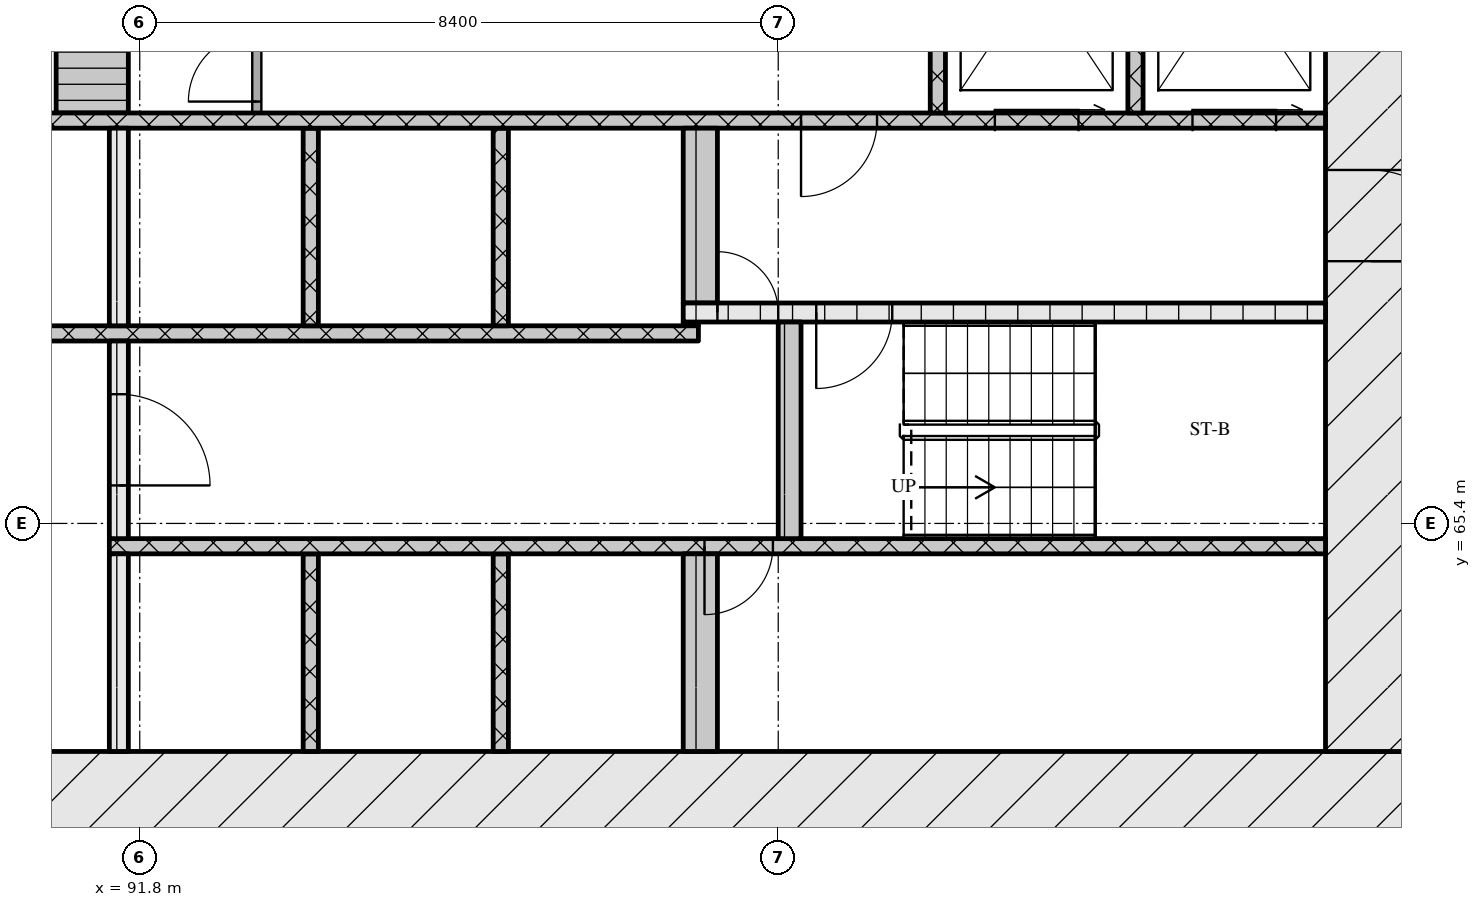
"""IFC4 building model, lengths in metres.
Left out: names, types, materials, properties, quantities, classifications, styles, units other than length and angle.
Written with IfcOpenShell. Run it as: python <this file> out.ifc"""

import sys

from ifc_helpers import new_model, si_unit, direction, frame, frame_2d, origin, place, context, subcontext, project, spatial, rectangle, extrude, element, fill, save


model = new_model("IFC4")
c1 = context("Model", 3, precision=1e-05, world=origin(), true_north=direction((0.0, 1.0)))
c2 = subcontext(c1, "Body", "Model", "MODEL_VIEW")
j1 = project(units=[si_unit("LENGTHUNIT", "METRE"), si_unit("PLANEANGLEUNIT", "RADIAN")], contexts=[c1])
p1 = place(None, origin())
s1 = spatial("IfcSite", under=j1, at=p1, CompositionType="ELEMENT")
p2 = place(p1, origin())
s2 = spatial("IfcBuilding", under=s1, at=p2, CompositionType="ELEMENT")
p3 = place(p2, frame((0.0, 0.0, 44.4)))
s3 = spatial("IfcBuildingStorey", under=s2, at=p3, CompositionType="ELEMENT", Elevation=44.4)
p4 = place(p3, frame((66.6, 61.8, 0.0), z_axis=(0.0, 0.0, 1.0), x_axis=(1.0, 0.0, 0.0)))
e1 = element("IfcWall", 1, at=p4, inside=s3, PredefinedType="SOLIDWALL", context=c2, shape_type="SweptSolid", body=[
    extrude(rectangle(XDim=42.0, YDim=1.2, at=frame_2d((21.0, 0.0))), origin(), (0.0, 0.0, 1.0), 3.32),
])
p5 = place(p4, frame((21.35, 0.0, 0.0)))
e2 = element("IfcOpeningElement", 2, at=p5, cuts=e1, PredefinedType="OPENING", context=c2, shape_type="SweptSolid", body=[
    extrude(rectangle(XDim=1.8, YDim=2.1, at=frame_2d((0.9, 1.05))), frame((0.0, 0.61, 0.0), z_axis=(0.0, -1.0, 0.0), x_axis=(1.0, 0.0, 0.0)), (0.0, 0.0, 1.0), 1.22),
])
p6 = place(p3, frame((108.0, 62.4, 0.0), z_axis=(0.0, 0.0, 1.0), x_axis=(0.0, 1.0, 0.0)))
e3 = element("IfcWall", 3, at=p6, inside=s3, PredefinedType="SOLIDWALL", context=c2, shape_type="SweptSolid", body=[
    extrude(rectangle(XDim=12.0, YDim=1.2, at=frame_2d((6.0, 0.0))), origin(), (0.0, 0.0, 1.0), 3.32),
])
p7 = place(p6, frame((6.45, 0.0, 0.0)))
e4 = element("IfcOpeningElement", 4, at=p7, cuts=e3, PredefinedType="OPENING", context=c2, shape_type="SweptSolid", body=[
    extrude(rectangle(XDim=1.2, YDim=2.1, at=frame_2d((0.6, 1.05))), frame((0.0, 0.61, 0.0), z_axis=(0.0, -1.0, 0.0), x_axis=(1.0, 0.0, 0.0)), (0.0, 0.0, 1.0), 1.22),
])
p8 = place(p3, frame((91.525, 62.4, 0.0), z_axis=(0.0, 0.0, 1.0), x_axis=(0.0, 1.0, 0.0)))
e5 = element("IfcWall", 5, at=p8, inside=s3, PredefinedType="SOLIDWALL", context=c2, shape_type="SweptSolid", body=[
    extrude(rectangle(XDim=2.6, YDim=0.25, at=frame_2d((1.3, 0.0))), origin(), (0.0, 0.0, 1.0), 3.32),
])
for number, where, z_axis, x_axis in (
    (6, (94.05, 62.4, 0.0), (0.0, 0.0, 1.0), (0.0, 1.0, 0.0)),
    (7, (96.55, 62.4, 0.0), (0.0, 0.0, 1.0), (0.0, 1.0, 0.0)),
):
    element("IfcWall", number, at=place(p3, frame(where, z_axis=z_axis, x_axis=x_axis)), inside=s3, PredefinedType="SOLIDWALL", context=c2, shape_type="SweptSolid", body=[
        extrude(rectangle(XDim=2.6, YDim=0.2, at=frame_2d((1.3, 0.0))), origin(), (0.0, 0.0, 1.0), 3.32),
    ])
p9 = place(p3, frame((99.175, 62.4, 0.0), z_axis=(0.0, 0.0, 1.0), x_axis=(0.0, 1.0, 0.0)))
e8 = element("IfcWall", 8, at=p9, inside=s3, PredefinedType="SOLIDWALL", context=c2, shape_type="SweptSolid", body=[
    extrude(rectangle(XDim=2.6, YDim=0.45, at=frame_2d((1.3, 0.0))), origin(), (0.0, 0.0, 1.0), 3.32),
])
p10 = place(p3, frame((91.4, 65.1, 0.0), z_axis=(0.0, 0.0, 1.0), x_axis=(1.0, 0.0, 0.0)))
e9 = element("IfcWall", 9, at=p10, inside=s3, PredefinedType="SOLIDWALL", context=c2, shape_type="SweptSolid", body=[
    extrude(rectangle(XDim=16.0, YDim=0.2, at=frame_2d((8.0, 0.0))), origin(), (0.0, 0.0, 1.0), 3.32),
])
p11 = place(p10, frame((7.83, 0.0, 0.0)))
e10 = element("IfcOpeningElement", 10, at=p11, cuts=e9, PredefinedType="OPENING", context=c2, shape_type="SweptSolid", body=[
    extrude(rectangle(XDim=0.9, YDim=2.1, at=frame_2d((0.45, 1.05))), frame((0.0, 0.11, 0.0), z_axis=(0.0, -1.0, 0.0), x_axis=(1.0, 0.0, 0.0)), (0.0, 0.0, 1.0), 0.22),
])
p12 = place(p3, frame((91.525, 65.2, 0.0), z_axis=(0.0, 0.0, 1.0), x_axis=(0.0, 1.0, 0.0)))
e11 = element("IfcWall", 11, at=p12, inside=s3, PredefinedType="SOLIDWALL", context=c2, shape_type="SweptSolid", body=[
    extrude(rectangle(XDim=2.6, YDim=0.25, at=frame_2d((1.3, 0.0))), origin(), (0.0, 0.0, 1.0), 3.32),
])
p13 = place(p12, frame((0.7, 0.0, 0.0)))
e12 = element("IfcOpeningElement", 12, at=p13, cuts=e11, PredefinedType="OPENING", context=c2, shape_type="SweptSolid", body=[
    extrude(rectangle(XDim=1.2, YDim=2.1, at=frame_2d((0.6, 1.05))), frame((0.0, 0.135, 0.0), z_axis=(0.0, -1.0, 0.0), x_axis=(1.0, 0.0, 0.0)), (0.0, 0.0, 1.0), 0.27),
])
p14 = place(p3, frame((100.35, 65.2, 0.0), z_axis=(0.0, 0.0, 1.0), x_axis=(0.0, 1.0, 0.0)))
e13 = element("IfcWall", 13, at=p14, inside=s3, PredefinedType="SOLIDWALL", context=c2, shape_type="SweptSolid", body=[
    extrude(rectangle(XDim=2.85, YDim=0.3, at=frame_2d((1.425, 0.0))), origin(), (0.0, 0.0, 1.0), 3.32),
])
p15 = place(p3, frame((76.05, 67.9, 0.0), z_axis=(0.0, 0.0, 1.0), x_axis=(1.0, 0.0, 0.0)))
e14 = element("IfcWall", 14, at=p15, inside=s3, PredefinedType="SOLIDWALL", context=c2, shape_type="SweptSolid", body=[
    extrude(rectangle(XDim=23.1, YDim=0.2, at=frame_2d((11.55, 0.0))), origin(), (0.0, 0.0, 1.0), 3.32),
])
p16 = place(p15, frame((0.6, 0.0, 0.0)))
e15 = element("IfcOpeningElement", 15, at=p16, cuts=e14, PredefinedType="OPENING", context=c2, shape_type="SweptSolid", body=[
    extrude(rectangle(XDim=1.1, YDim=2.1, at=frame_2d((0.55, 1.05))), frame((0.0, 0.11, 0.0), z_axis=(0.0, -1.0, 0.0), x_axis=(1.0, 0.0, 0.0)), (0.0, 0.0, 1.0), 0.22),
])
p17 = place(p15, frame((3.1, 0.0, 0.0)))
e16 = element("IfcOpeningElement", 16, at=p17, cuts=e14, PredefinedType="OPENING", context=c2, shape_type="SweptSolid", body=[
    extrude(rectangle(XDim=1.1, YDim=2.1, at=frame_2d((0.55, 1.05))), frame((0.0, 0.11, 0.0), z_axis=(0.0, -1.0, 0.0), x_axis=(1.0, 0.0, 0.0)), (0.0, 0.0, 1.0), 0.22),
])
p18 = place(p15, frame((5.6, 0.0, 0.0)))
e17 = element("IfcOpeningElement", 17, at=p18, cuts=e14, PredefinedType="OPENING", context=c2, shape_type="SweptSolid", body=[
    extrude(rectangle(XDim=1.1, YDim=2.1, at=frame_2d((0.55, 1.05))), frame((0.0, 0.11, 0.0), z_axis=(0.0, -1.0, 0.0), x_axis=(1.0, 0.0, 0.0)), (0.0, 0.0, 1.0), 0.22),
])
p19 = place(p15, frame((8.45, 0.0, 0.0)))
e18 = element("IfcOpeningElement", 18, at=p19, cuts=e14, PredefinedType="OPENING", context=c2, shape_type="SweptSolid", body=[
    extrude(rectangle(XDim=0.9, YDim=2.1, at=frame_2d((0.45, 1.05))), frame((0.0, 0.11, 0.0), z_axis=(0.0, -1.0, 0.0), x_axis=(1.0, 0.0, 0.0)), (0.0, 0.0, 1.0), 0.22),
])
p20 = place(p15, frame((10.91, 0.0, 0.0)))
e19 = element("IfcOpeningElement", 19, at=p20, cuts=e14, PredefinedType="OPENING", context=c2, shape_type="SweptSolid", body=[
    extrude(rectangle(XDim=0.9, YDim=2.1, at=frame_2d((0.45, 1.05))), frame((0.0, 0.11, 0.0), z_axis=(0.0, -1.0, 0.0), x_axis=(1.0, 0.0, 0.0)), (0.0, 0.0, 1.0), 0.22),
])
p21 = place(p15, frame((13.55, 0.0, 0.0)))
e20 = element("IfcOpeningElement", 20, at=p21, cuts=e14, PredefinedType="OPENING", context=c2, shape_type="SweptSolid", body=[
    extrude(rectangle(XDim=1.0, YDim=2.1, at=frame_2d((0.5, 1.05))), frame((0.0, 0.11, 0.0), z_axis=(0.0, -1.0, 0.0), x_axis=(1.0, 0.0, 0.0)), (0.0, 0.0, 1.0), 0.22),
])
p22 = place(p3, frame((91.525, 68.0, 0.0), z_axis=(0.0, 0.0, 1.0), x_axis=(0.0, 1.0, 0.0)))
e21 = element("IfcWall", 21, at=p22, inside=s3, PredefinedType="SOLIDWALL", context=c2, shape_type="SweptSolid", body=[
    extrude(rectangle(XDim=2.6, YDim=0.25, at=frame_2d((1.3, 0.0))), origin(), (0.0, 0.0, 1.0), 3.32),
])
for number, where, z_axis, x_axis in (
    (22, (94.05, 68.0, 0.0), (0.0, 0.0, 1.0), (0.0, 1.0, 0.0)),
    (23, (96.55, 68.0, 0.0), (0.0, 0.0, 1.0), (0.0, 1.0, 0.0)),
):
    element("IfcWall", number, at=place(p3, frame(where, z_axis=z_axis, x_axis=x_axis)), inside=s3, PredefinedType="SOLIDWALL", context=c2, shape_type="SweptSolid", body=[
        extrude(rectangle(XDim=2.6, YDim=0.2, at=frame_2d((1.3, 0.0))), origin(), (0.0, 0.0, 1.0), 3.32),
    ])
p23 = place(p3, frame((98.95, 68.025, 0.0), z_axis=(0.0, 0.0, 1.0), x_axis=(1.0, 0.0, 0.0)))
e24 = element("IfcWall", 24, at=p23, inside=s3, PredefinedType="SOLIDWALL", context=c2, shape_type="SweptSolid", body=[
    extrude(rectangle(XDim=0.2, YDim=0.05, at=frame_2d((0.1, 0.0))), origin(), (0.0, 0.0, 1.0), 3.32),
])
p24 = place(p3, frame((98.95, 68.175, 0.0), z_axis=(0.0, 0.0, 1.0), x_axis=(1.0, 0.0, 0.0)))
e25 = element("IfcWall", 25, at=p24, inside=s3, PredefinedType="SOLIDWALL", context=c2, shape_type="SweptSolid", body=[
    extrude(rectangle(XDim=8.45, YDim=0.25, at=frame_2d((4.225, 0.0))), origin(), (0.0, 0.0, 1.0), 3.32),
])
p25 = place(p24, frame((0.45, 0.0, 0.0)))
e26 = element("IfcOpeningElement", 26, at=p25, cuts=e25, PredefinedType="OPENING", context=c2, shape_type="SweptSolid", body=[
    extrude(rectangle(XDim=0.8, YDim=2.1, at=frame_2d((0.4, 1.05))), frame((0.0, 0.135, 0.0), z_axis=(0.0, -1.0, 0.0), x_axis=(1.0, 0.0, 0.0)), (0.0, 0.0, 1.0), 0.27),
])
p26 = place(p24, frame((1.75, 0.0, 0.0)))
e27 = element("IfcOpeningElement", 27, at=p26, cuts=e25, PredefinedType="OPENING", context=c2, shape_type="SweptSolid", body=[
    extrude(rectangle(XDim=1.0, YDim=2.1, at=frame_2d((0.5, 1.05))), frame((0.0, 0.135, 0.0), z_axis=(0.0, -1.0, 0.0), x_axis=(1.0, 0.0, 0.0)), (0.0, 0.0, 1.0), 0.27),
])
p27 = place(p3, frame((99.175, 68.3, 0.0), z_axis=(0.0, 0.0, 1.0), x_axis=(0.0, 1.0, 0.0)))
e28 = element("IfcWall", 28, at=p27, inside=s3, PredefinedType="SOLIDWALL", context=c2, shape_type="SweptSolid", body=[
    extrude(rectangle(XDim=2.3, YDim=0.45, at=frame_2d((1.15, 0.0))), origin(), (0.0, 0.0, 1.0), 3.32),
])
p28 = place(p3, frame((67.8, 70.7, 0.0), z_axis=(0.0, 0.0, 1.0), x_axis=(1.0, 0.0, 0.0)))
e29 = element("IfcWall", 29, at=p28, inside=s3, PredefinedType="SOLIDWALL", context=c2, shape_type="SweptSolid", body=[
    extrude(rectangle(XDim=39.6, YDim=0.2, at=frame_2d((19.8, 0.0))), origin(), (0.0, 0.0, 1.0), 3.32),
])
p29 = place(p28, frame((0.65, 0.0, 0.0)))
e30 = element("IfcOpeningElement", 30, at=p29, cuts=e29, PredefinedType="OPENING", context=c2, shape_type="SweptSolid", body=[
    extrude(rectangle(XDim=1.1, YDim=2.1, at=frame_2d((0.55, 1.05))), frame((0.0, 0.11, 0.0), z_axis=(0.0, -1.0, 0.0), x_axis=(1.0, 0.0, 0.0)), (0.0, 0.0, 1.0), 0.22),
])
p30 = place(p28, frame((3.25, 0.0, 0.0)))
e31 = element("IfcOpeningElement", 31, at=p30, cuts=e29, PredefinedType="OPENING", context=c2, shape_type="SweptSolid", body=[
    extrude(rectangle(XDim=1.1, YDim=2.1, at=frame_2d((0.55, 1.05))), frame((0.0, 0.11, 0.0), z_axis=(0.0, -1.0, 0.0), x_axis=(1.0, 0.0, 0.0)), (0.0, 0.0, 1.0), 0.22),
])
p31 = place(p28, frame((5.9, 0.0, 0.0)))
e32 = element("IfcOpeningElement", 32, at=p31, cuts=e29, PredefinedType="OPENING", context=c2, shape_type="SweptSolid", body=[
    extrude(rectangle(XDim=1.0, YDim=2.1, at=frame_2d((0.5, 1.05))), frame((0.0, 0.11, 0.0), z_axis=(0.0, -1.0, 0.0), x_axis=(1.0, 0.0, 0.0)), (0.0, 0.0, 1.0), 0.22),
])
p32 = place(p28, frame((21.7, 0.0, 0.0)))
e33 = element("IfcOpeningElement", 33, at=p32, cuts=e29, PredefinedType="OPENING", context=c2, shape_type="SweptSolid", body=[
    extrude(rectangle(XDim=1.0, YDim=2.1, at=frame_2d((0.5, 1.05))), frame((0.0, 0.11, 0.0), z_axis=(0.0, -1.0, 0.0), x_axis=(1.0, 0.0, 0.0)), (0.0, 0.0, 1.0), 0.22),
])
p33 = place(p28, frame((32.7, 0.0, 0.0)))
e34 = element("IfcOpeningElement", 34, at=p33, cuts=e29, PredefinedType="OPENING", context=c2, shape_type="SweptSolid", body=[
    extrude(rectangle(XDim=1.0, YDim=2.1, at=frame_2d((0.5, 1.05))), frame((0.0, 0.11, 0.0), z_axis=(0.0, -1.0, 0.0), x_axis=(1.0, 0.0, 0.0)), (0.0, 0.0, 1.0), 0.22),
])
p34 = place(p28, frame((35.25, 0.0, 0.0)))
e35 = element("IfcOpeningElement", 35, at=p34, cuts=e29, PredefinedType="OPENING", context=c2, shape_type="SweptSolid", body=[
    extrude(rectangle(XDim=1.1, YDim=2.1, at=frame_2d((0.55, 1.05))), frame((0.0, 0.11, 0.0), z_axis=(0.0, -1.0, 0.0), x_axis=(1.0, 0.0, 0.0)), (0.0, 0.0, 1.0), 0.22),
])
p35 = place(p28, frame((37.85, 0.0, 0.0)))
e36 = element("IfcOpeningElement", 36, at=p35, cuts=e29, PredefinedType="OPENING", context=c2, shape_type="SweptSolid", body=[
    extrude(rectangle(XDim=1.1, YDim=2.1, at=frame_2d((0.55, 1.05))), frame((0.0, 0.11, 0.0), z_axis=(0.0, -1.0, 0.0), x_axis=(1.0, 0.0, 0.0)), (0.0, 0.0, 1.0), 0.22),
])
p36 = place(p3, frame((91.175, 70.8, 0.0), z_axis=(0.0, 0.0, 1.0), x_axis=(0.0, 1.0, 0.0)))
e37 = element("IfcWall", 37, at=p36, inside=s3, PredefinedType="SOLIDWALL", context=c2, shape_type="SweptSolid", body=[
    extrude(rectangle(XDim=2.95, YDim=0.95, at=frame_2d((1.475, 0.0))), origin(), (0.0, 0.0, 1.0), 3.32),
])
p37 = place(p3, frame((93.34, 70.8, 0.0), z_axis=(0.0, 0.0, 1.0), x_axis=(0.0, 1.0, 0.0)))
e38 = element("IfcWall", 38, at=p37, inside=s3, PredefinedType="PARTITIONING", context=c2, shape_type="SweptSolid", body=[
    extrude(rectangle(XDim=1.2, YDim=0.12, at=frame_2d((0.6, 0.0))), origin(), (0.0, 0.0, 1.0), 3.32),
])
p38 = place(p37, frame((0.15, 0.0, 0.0)))
e39 = element("IfcOpeningElement", 39, at=p38, cuts=e38, PredefinedType="OPENING", context=c2, shape_type="SweptSolid", body=[
    extrude(rectangle(XDim=0.9, YDim=2.1, at=frame_2d((0.45, 1.05))), frame((0.0, 0.07, 0.0), z_axis=(0.0, -1.0, 0.0), x_axis=(1.0, 0.0, 0.0)), (0.0, 0.0, 1.0), 0.14),
])
p39 = place(p3, frame((102.3, 70.8, 0.0), z_axis=(0.0, 0.0, 1.0), x_axis=(0.0, 1.0, 0.0)))
e40 = element("IfcWall", 40, at=p39, inside=s3, PredefinedType="SOLIDWALL", context=c2, shape_type="SweptSolid", body=[
    extrude(rectangle(XDim=1.2, YDim=0.2, at=frame_2d((0.6, 0.0))), origin(), (0.0, 0.0, 1.0), 3.32),
])
p40 = place(p3, frame((104.9, 70.8, 0.0), z_axis=(0.0, 0.0, 1.0), x_axis=(0.0, 1.0, 0.0)))
e41 = element("IfcWall", 41, at=p40, inside=s3, PredefinedType="SOLIDWALL", context=c2, shape_type="SweptSolid", body=[
    extrude(rectangle(XDim=3.6, YDim=0.2, at=frame_2d((1.8, 0.0))), origin(), (0.0, 0.0, 1.0), 3.32),
])
p41 = place(p11, origin())
e42 = element("IfcDoor", 42, at=p41, inside=s3, OperationType="SINGLE_SWING_RIGHT", PredefinedType="DOOR", context=c2, shape_type="SweptSolid", body=[
    extrude(rectangle(XDim=0.9, YDim=2.1, at=frame_2d((0.45, 1.05))), frame((0.0, 0.025, 0.0), z_axis=(0.0, -1.0, 0.0), x_axis=(1.0, 0.0, 0.0)), (0.0, 0.0, 1.0), 0.05),
])
fill(e10, e42)
p42 = place(p13, origin())
e43 = element("IfcDoor", 43, at=p42, inside=s3, OperationType="SINGLE_SWING_RIGHT", PredefinedType="DOOR", context=c2, shape_type="SweptSolid", body=[
    extrude(rectangle(XDim=1.2, YDim=2.1, at=frame_2d((0.6, 1.05))), frame((0.0, 0.025, 0.0), z_axis=(0.0, -1.0, 0.0), x_axis=(1.0, 0.0, 0.0)), (0.0, 0.0, 1.0), 0.05),
])
fill(e12, e43)
p43 = place(p25, origin())
e44 = element("IfcDoor", 44, at=p43, inside=s3, OperationType="SINGLE_SWING_LEFT", PredefinedType="DOOR", context=c2, shape_type="SweptSolid", body=[
    extrude(rectangle(XDim=0.8, YDim=2.1, at=frame_2d((0.4, 1.05))), frame((0.0, 0.025, 0.0), z_axis=(0.0, -1.0, 0.0), x_axis=(1.0, 0.0, 0.0)), (0.0, 0.0, 1.0), 0.05),
])
fill(e26, e44)
p44 = place(p26, origin())
e45 = element("IfcDoor", 45, at=p44, inside=s3, OperationType="SINGLE_SWING_RIGHT", PredefinedType="DOOR", context=c2, shape_type="SweptSolid", body=[
    extrude(rectangle(XDim=1.0, YDim=2.1, at=frame_2d((0.5, 1.05))), frame((0.0, 0.025, 0.0), z_axis=(0.0, -1.0, 0.0), x_axis=(1.0, 0.0, 0.0)), (0.0, 0.0, 1.0), 0.05),
])
fill(e27, e45)
p45 = place(p7, origin())
e46 = element("IfcDoor", 46, at=p45, inside=s3, OperationType="SINGLE_SWING_RIGHT", PredefinedType="DOOR", context=c2, shape_type="SweptSolid", body=[
    extrude(rectangle(XDim=1.2, YDim=2.1, at=frame_2d((0.6, 1.05))), frame((0.0, 0.025, 0.0), z_axis=(0.0, -1.0, 0.0), x_axis=(1.0, 0.0, 0.0)), (0.0, 0.0, 1.0), 0.05),
])
fill(e4, e46)
p46 = place(p33, origin())
e47 = element("IfcDoor", 47, at=p46, inside=s3, OperationType="SINGLE_SWING_RIGHT", PredefinedType="DOOR", context=c2, shape_type="SweptSolid", body=[
    extrude(rectangle(XDim=1.0, YDim=2.1, at=frame_2d((0.5, 1.05))), frame((0.0, 0.025, 0.0), z_axis=(0.0, -1.0, 0.0), x_axis=(1.0, 0.0, 0.0)), (0.0, 0.0, 1.0), 0.05),
])
fill(e34, e47)
p47 = place(p34, origin())
e48 = element("IfcDoor", 48, at=p47, inside=s3, OperationType="SLIDING_TO_RIGHT", PredefinedType="DOOR", context=c2, shape_type="SweptSolid", body=[
    extrude(rectangle(XDim=1.1, YDim=2.1, at=frame_2d((0.55, 1.05))), frame((0.0, 0.025, 0.0), z_axis=(0.0, -1.0, 0.0), x_axis=(1.0, 0.0, 0.0)), (0.0, 0.0, 1.0), 0.05),
])
fill(e35, e48)
p48 = place(p35, origin())
e49 = element("IfcDoor", 49, at=p48, inside=s3, OperationType="SLIDING_TO_RIGHT", PredefinedType="DOOR", context=c2, shape_type="SweptSolid", body=[
    extrude(rectangle(XDim=1.1, YDim=2.1, at=frame_2d((0.55, 1.05))), frame((0.0, 0.025, 0.0), z_axis=(0.0, -1.0, 0.0), x_axis=(1.0, 0.0, 0.0)), (0.0, 0.0, 1.0), 0.05),
])
fill(e36, e49)
p49 = place(p38, origin())
e50 = element("IfcDoor", 50, at=p49, inside=s3, OperationType="SINGLE_SWING_LEFT", PredefinedType="DOOR", context=c2, shape_type="SweptSolid", body=[
    extrude(rectangle(XDim=0.9, YDim=2.1, at=frame_2d((0.45, 1.05))), frame((0.0, 0.025, 0.0), z_axis=(0.0, -1.0, 0.0), x_axis=(1.0, 0.0, 0.0)), (0.0, 0.0, 1.0), 0.05),
])
fill(e39, e50)
save(model, sys.argv[1])
